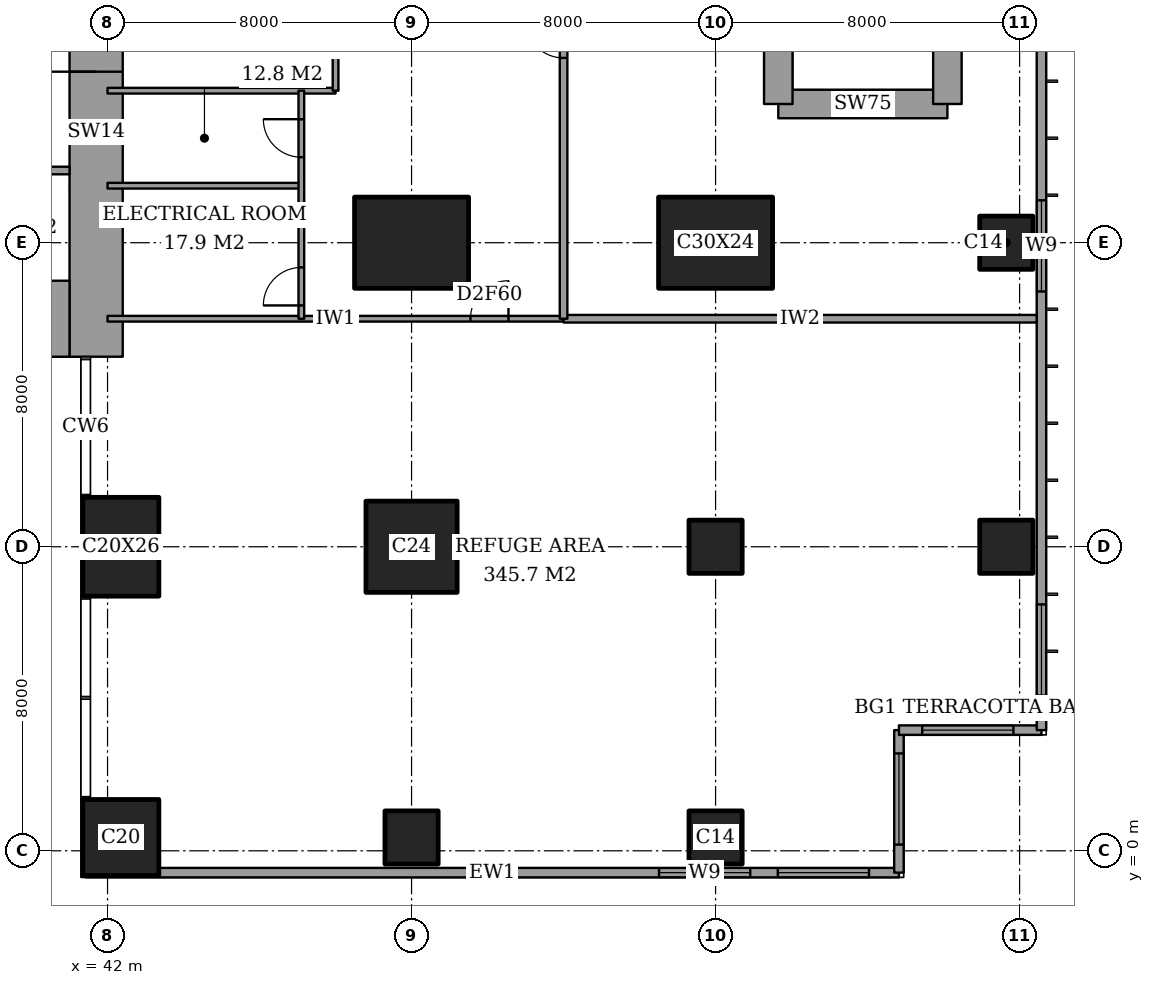
"""IFC4 building model, lengths in metres.
Left out: names, types, materials, properties, quantities, classifications, styles, units other than length and angle.
Written with IfcOpenShell. Run it as: python <this file> out.ifc"""

import sys

from ifc_helpers import new_model, si_unit, direction, frame, frame_2d, origin, origin_2d, place, context, subcontext, project, spatial, rectangle, extrude, element, fill, save


model = new_model("IFC4")
c1 = context("Model", 3, precision=1e-05, world=origin(), true_north=direction((0.0, 1.0)))
c2 = subcontext(c1, "Body", "Model", "MODEL_VIEW")
j1 = project(units=[si_unit("LENGTHUNIT", "METRE"), si_unit("PLANEANGLEUNIT", "RADIAN")], contexts=[c1])
p1 = place(None, origin())
s1 = spatial("IfcSite", under=j1, at=p1, CompositionType="ELEMENT")
p2 = place(p1, origin())
s2 = spatial("IfcBuilding", under=s1, at=p2, CompositionType="ELEMENT")
p3 = place(p2, frame((0.0, 0.0, 277.2)))
s3 = spatial("IfcBuildingStorey", under=s2, at=p3, CompositionType="ELEMENT", Elevation=277.2)
p4 = place(p3, frame((42.35, 0.35, 0.0), z_axis=(0.0, 0.0, 1.0), x_axis=(1.0, 0.0, 0.0)))
e1 = element("IfcColumn", 1, at=p4, inside=s3, PredefinedType="COLUMN", context=c2, shape_type="SweptSolid", body=[
    extrude(rectangle(XDim=2.0, YDim=2.0, at=origin_2d()), origin(), (0.0, 0.0, 1.0), 5.4),
])
p5 = place(p3, frame((42.35, 8.0, 0.0), z_axis=(0.0, 0.0, 1.0), x_axis=(1.0, 0.0, 0.0)))
e2 = element("IfcColumn", 2, at=p5, inside=s3, PredefinedType="COLUMN", context=c2, shape_type="SweptSolid", body=[
    extrude(rectangle(XDim=2.0, YDim=2.6, at=origin_2d()), origin(), (0.0, 0.0, 1.0), 5.4),
])
p6 = place(p3, frame((50.0, 0.35, 0.0), z_axis=(0.0, 0.0, 1.0), x_axis=(1.0, 0.0, 0.0)))
e3 = element("IfcColumn", 3, at=p6, inside=s3, PredefinedType="COLUMN", context=c2, shape_type="SweptSolid", body=[
    extrude(rectangle(XDim=1.4, YDim=1.4, at=origin_2d()), origin(), (0.0, 0.0, 1.0), 5.4),
])
p7 = place(p3, frame((50.0, 8.0, 0.0), z_axis=(0.0, 0.0, 1.0), x_axis=(1.0, 0.0, 0.0)))
e4 = element("IfcColumn", 4, at=p7, inside=s3, PredefinedType="COLUMN", context=c2, shape_type="SweptSolid", body=[
    extrude(rectangle(XDim=2.4, YDim=2.4, at=origin_2d()), origin(), (0.0, 0.0, 1.0), 5.4),
])
p8 = place(p3, frame((50.0, 16.0, 0.0), z_axis=(0.0, 0.0, 1.0), x_axis=(1.0, 0.0, 0.0)))
e5 = element("IfcColumn", 5, at=p8, inside=s3, PredefinedType="COLUMN", context=c2, shape_type="SweptSolid", body=[
    extrude(rectangle(XDim=3.0, YDim=2.4, at=origin_2d()), origin(), (0.0, 0.0, 1.0), 5.4),
])
for number, where, z_axis, x_axis in (
    (6, (58.0, 0.35, 0.0), (0.0, 0.0, 1.0), (1.0, 0.0, 0.0)),
    (7, (58.0, 8.0, 0.0), (0.0, 0.0, 1.0), (1.0, 0.0, 0.0)),
):
    element("IfcColumn", number, at=place(p3, frame(where, z_axis=z_axis, x_axis=x_axis)), inside=s3, PredefinedType="COLUMN", context=c2, shape_type="SweptSolid", body=[
        extrude(rectangle(XDim=1.4, YDim=1.4, at=origin_2d()), origin(), (0.0, 0.0, 1.0), 5.4),
    ])
p9 = place(p3, frame((58.0, 16.0, 0.0), z_axis=(0.0, 0.0, 1.0), x_axis=(1.0, 0.0, 0.0)))
e8 = element("IfcColumn", 8, at=p9, inside=s3, PredefinedType="COLUMN", context=c2, shape_type="SweptSolid", body=[
    extrude(rectangle(XDim=3.0, YDim=2.4, at=origin_2d()), origin(), (0.0, 0.0, 1.0), 5.4),
])
for number, where, z_axis, x_axis in (
    (9, (65.65, 8.0, 0.0), (0.0, 0.0, 1.0), (1.0, 0.0, 0.0)),
    (10, (65.65, 16.0, 0.0), (0.0, 0.0, 1.0), (1.0, 0.0, 0.0)),
):
    element("IfcColumn", number, at=place(p3, frame(where, z_axis=z_axis, x_axis=x_axis)), inside=s3, PredefinedType="COLUMN", context=c2, shape_type="SweptSolid", body=[
        extrude(rectangle(XDim=1.4, YDim=1.4, at=origin_2d()), origin(), (0.0, 0.0, 1.0), 5.4),
    ])
p10 = place(p3, frame((37.85, 14.0, 0.0), z_axis=(0.0, 0.0, 1.0), x_axis=(1.0, 0.0, 0.0)))
e11 = element("IfcWall", 11, at=p10, inside=s3, PredefinedType="SHEAR", context=c2, shape_type="SweptSolid", body=[
    extrude(rectangle(XDim=3.15, YDim=2.0, at=frame_2d((1.575, 0.0))), origin(), (0.0, 0.0, 1.0), 5.4),
])
p11 = place(p3, frame((41.7, 13.0, 0.0), z_axis=(0.0, 0.0, 1.0), x_axis=(0.0, 1.0, 0.0)))
e12 = element("IfcWall", 12, at=p11, inside=s3, PredefinedType="SHEAR", context=c2, shape_type="SweptSolid", body=[
    extrude(rectangle(XDim=11.85, YDim=1.4, at=frame_2d((5.925, 0.0))), origin(), (0.0, 0.0, 1.0), 5.4),
])
p12 = place(p11, frame((7.5, 0.0, 0.0)))
e13 = element("IfcOpeningElement", 13, at=p12, cuts=e12, PredefinedType="OPENING", context=c2, shape_type="SweptSolid", body=[
    extrude(rectangle(XDim=1.8, YDim=2.4, at=frame_2d((0.9, 1.2))), frame((0.0, 0.71, 0.0), z_axis=(0.0, -1.0, 0.0), x_axis=(1.0, 0.0, 0.0)), (0.0, 0.0, 1.0), 1.42),
])
p13 = place(p3, frame((59.65, 19.65, 0.0), z_axis=(0.0, 0.0, 1.0), x_axis=(1.0, 0.0, 0.0)))
e14 = element("IfcWall", 14, at=p13, inside=s3, PredefinedType="SHEAR", context=c2, shape_type="SweptSolid", body=[
    extrude(rectangle(XDim=4.45, YDim=0.75, at=frame_2d((2.225, 0.0))), origin(), (0.0, 0.0, 1.0), 5.4),
])
for number, where, z_axis, x_axis in (
    (15, (64.1, 19.65, 0.0), (0.0, 0.0, 1.0), (0.0, 1.0, 0.0)),
    (16, (59.65, 28.35, 0.0), (0.0, 0.0, 1.0), (0.0, -1.0, 0.0)),
):
    element("IfcWall", number, at=place(p3, frame(where, z_axis=z_axis, x_axis=x_axis)), inside=s3, PredefinedType="SHEAR", context=c2, shape_type="SweptSolid", body=[
        extrude(rectangle(XDim=8.7, YDim=0.75, at=frame_2d((4.35, 0.0))), origin(), (0.0, 0.0, 1.0), 5.4),
    ])
p14 = place(p3, frame((41.425, -0.575, 0.0), z_axis=(0.0, 0.0, 1.0), x_axis=(1.0, 0.0, 0.0)))
e17 = element("IfcWall", 17, at=p14, inside=s3, PredefinedType="SOLIDWALL", context=c2, shape_type="SweptSolid", body=[
    extrude(rectangle(XDim=21.4, YDim=0.25, at=frame_2d((10.7, 0.0))), origin(), (0.0, 0.0, 1.0), 5.4),
])
p15 = place(p14, frame((15.087, 0.0, 0.9)))
e18 = element("IfcOpeningElement", 18, at=p15, cuts=e17, PredefinedType="OPENING", context=c2, shape_type="SweptSolid", body=[
    extrude(rectangle(XDim=2.4, YDim=2.4, at=frame_2d((1.2, 1.2))), frame((0.0, 0.135, 0.0), z_axis=(0.0, -1.0, 0.0), x_axis=(1.0, 0.0, 0.0)), (0.0, 0.0, 1.0), 0.27),
])
p16 = place(p14, frame((18.212, 0.0, 0.9)))
e19 = element("IfcOpeningElement", 19, at=p16, cuts=e17, PredefinedType="OPENING", context=c2, shape_type="SweptSolid", body=[
    extrude(rectangle(XDim=2.4, YDim=2.4, at=frame_2d((1.2, 1.2))), frame((0.0, 0.135, 0.0), z_axis=(0.0, -1.0, 0.0), x_axis=(1.0, 0.0, 0.0)), (0.0, 0.0, 1.0), 0.27),
])
p17 = place(p3, frame((62.825, -0.575, 0.0), z_axis=(0.0, 0.0, 1.0), x_axis=(0.0, 1.0, 0.0)))
e20 = element("IfcWall", 20, at=p17, inside=s3, PredefinedType="SOLIDWALL", context=c2, shape_type="SweptSolid", body=[
    extrude(rectangle(XDim=3.75, YDim=0.25, at=frame_2d((1.875, 0.0))), origin(), (0.0, 0.0, 1.0), 5.4),
])
p18 = place(p17, frame((0.738, 0.0, 0.9)))
e21 = element("IfcOpeningElement", 21, at=p18, cuts=e20, PredefinedType="OPENING", context=c2, shape_type="SweptSolid", body=[
    extrude(rectangle(XDim=2.4, YDim=2.4, at=frame_2d((1.2, 1.2))), frame((0.0, 0.135, 0.0), z_axis=(0.0, -1.0, 0.0), x_axis=(1.0, 0.0, 0.0)), (0.0, 0.0, 1.0), 0.27),
])
p19 = place(p3, frame((62.825, 3.175, 0.0), z_axis=(0.0, 0.0, 1.0), x_axis=(1.0, 0.0, 0.0)))
e22 = element("IfcWall", 22, at=p19, inside=s3, PredefinedType="SOLIDWALL", context=c2, shape_type="SweptSolid", body=[
    extrude(rectangle(XDim=3.75, YDim=0.25, at=frame_2d((1.875, 0.0))), origin(), (0.0, 0.0, 1.0), 5.4),
])
p20 = place(p19, frame((0.613, 0.0, 0.9)))
e23 = element("IfcOpeningElement", 23, at=p20, cuts=e22, PredefinedType="OPENING", context=c2, shape_type="SweptSolid", body=[
    extrude(rectangle(XDim=2.4, YDim=2.4, at=frame_2d((1.2, 1.2))), frame((0.0, 0.135, 0.0), z_axis=(0.0, -1.0, 0.0), x_axis=(1.0, 0.0, 0.0)), (0.0, 0.0, 1.0), 0.27),
])
p21 = place(p3, frame((66.575, 3.175, 0.0), z_axis=(0.0, 0.0, 1.0), x_axis=(0.0, 1.0, 0.0)))
e24 = element("IfcWall", 24, at=p21, inside=s3, PredefinedType="SOLIDWALL", context=c2, shape_type="SweptSolid", body=[
    extrude(rectangle(XDim=41.65, YDim=0.25, at=frame_2d((20.825, 0.0))), origin(), (0.0, 0.0, 1.0), 5.4),
])
p22 = place(p21, frame((0.908, 0.0, 0.9)))
e25 = element("IfcOpeningElement", 25, at=p22, cuts=e24, PredefinedType="OPENING", context=c2, shape_type="SweptSolid", body=[
    extrude(rectangle(XDim=2.4, YDim=2.4, at=frame_2d((1.2, 1.2))), frame((0.0, 0.135, 0.0), z_axis=(0.0, -1.0, 0.0), x_axis=(1.0, 0.0, 0.0)), (0.0, 0.0, 1.0), 0.27),
])
p23 = place(p21, frame((11.542, 0.0, 0.9)))
e26 = element("IfcOpeningElement", 26, at=p23, cuts=e24, PredefinedType="OPENING", context=c2, shape_type="SweptSolid", body=[
    extrude(rectangle(XDim=2.4, YDim=2.4, at=frame_2d((1.2, 1.2))), frame((0.0, 0.135, 0.0), z_axis=(0.0, -1.0, 0.0), x_axis=(1.0, 0.0, 0.0)), (0.0, 0.0, 1.0), 0.27),
])
p24 = place(p21, frame((27.708, 0.0, 0.9)))
e27 = element("IfcOpeningElement", 27, at=p24, cuts=e24, PredefinedType="OPENING", context=c2, shape_type="SweptSolid", body=[
    extrude(rectangle(XDim=2.4, YDim=2.4, at=frame_2d((1.2, 1.2))), frame((0.0, 0.135, 0.0), z_axis=(0.0, -1.0, 0.0), x_axis=(1.0, 0.0, 0.0)), (0.0, 0.0, 1.0), 0.27),
])
p25 = place(p21, frame((38.342, 0.0, 0.9)))
e28 = element("IfcOpeningElement", 28, at=p25, cuts=e24, PredefinedType="OPENING", context=c2, shape_type="SweptSolid", body=[
    extrude(rectangle(XDim=2.4, YDim=2.4, at=frame_2d((1.2, 1.2))), frame((0.0, 0.135, 0.0), z_axis=(0.0, -1.0, 0.0), x_axis=(1.0, 0.0, 0.0)), (0.0, 0.0, 1.0), 0.27),
])
p26 = place(p3, frame((54.0, 14.0, 0.0), z_axis=(0.0, 0.0, 1.0), x_axis=(1.0, 0.0, 0.0)))
e29 = element("IfcWall", 29, at=p26, inside=s3, PredefinedType="PARTITIONING", context=c2, shape_type="SweptSolid", body=[
    extrude(rectangle(XDim=12.45, YDim=0.2, at=frame_2d((6.225, 0.0))), origin(), (0.0, 0.0, 1.0), 5.15),
])
p27 = place(p3, frame((42.0, 14.0, 0.0), z_axis=(0.0, 0.0, 1.0), x_axis=(1.0, 0.0, 0.0)))
e30 = element("IfcWall", 30, at=p27, inside=s3, PredefinedType="PARTITIONING", context=c2, shape_type="SweptSolid", body=[
    extrude(rectangle(XDim=12.0, YDim=0.15, at=frame_2d((6.0, 0.0))), origin(), (0.0, 0.0, 1.0), 5.15),
])
p28 = place(p27, frame((9.55, 0.0, 0.0)))
e31 = element("IfcOpeningElement", 31, at=p28, cuts=e30, PredefinedType="OPENING", context=c2, shape_type="SweptSolid", body=[
    extrude(rectangle(XDim=1.0, YDim=2.1, at=frame_2d((0.5, 1.05))), frame((0.0, 0.085, 0.0), z_axis=(0.0, -1.0, 0.0), x_axis=(1.0, 0.0, 0.0)), (0.0, 0.0, 1.0), 0.17),
])
p29 = place(p3, frame((42.0, 17.5, 0.0), z_axis=(0.0, 0.0, 1.0), x_axis=(1.0, 0.0, 0.0)))
e32 = element("IfcWall", 32, at=p29, inside=s3, PredefinedType="PARTITIONING", context=c2, shape_type="SweptSolid", body=[
    extrude(rectangle(XDim=5.1, YDim=0.15, at=frame_2d((2.55, 0.0))), origin(), (0.0, 0.0, 1.0), 5.15),
])
p30 = place(p3, frame((42.0, 20.0, 0.0), z_axis=(0.0, 0.0, 1.0), x_axis=(1.0, 0.0, 0.0)))
e33 = element("IfcWall", 33, at=p30, inside=s3, PredefinedType="PARTITIONING", context=c2, shape_type="SweptSolid", body=[
    extrude(rectangle(XDim=6.0, YDim=0.15, at=frame_2d((3.0, 0.0))), origin(), (0.0, 0.0, 1.0), 5.15),
])
p31 = place(p3, frame((47.1, 14.0, 0.0), z_axis=(0.0, 0.0, 1.0), x_axis=(0.0, 1.0, 0.0)))
e34 = element("IfcWall", 34, at=p31, inside=s3, PredefinedType="PARTITIONING", context=c2, shape_type="SweptSolid", body=[
    extrude(rectangle(XDim=6.0, YDim=0.15, at=frame_2d((3.0, 0.0))), origin(), (0.0, 0.0, 1.0), 5.15),
])
p32 = place(p31, frame((0.35, 0.0, 0.0)))
e35 = element("IfcOpeningElement", 35, at=p32, cuts=e34, PredefinedType="OPENING", context=c2, shape_type="SweptSolid", body=[
    extrude(rectangle(XDim=1.0, YDim=2.1, at=frame_2d((0.5, 1.05))), frame((0.0, 0.085, 0.0), z_axis=(0.0, -1.0, 0.0), x_axis=(1.0, 0.0, 0.0)), (0.0, 0.0, 1.0), 0.17),
])
p33 = place(p31, frame((4.25, 0.0, 0.0)))
e36 = element("IfcOpeningElement", 36, at=p33, cuts=e34, PredefinedType="OPENING", context=c2, shape_type="SweptSolid", body=[
    extrude(rectangle(XDim=1.0, YDim=2.1, at=frame_2d((0.5, 1.05))), frame((0.0, 0.085, 0.0), z_axis=(0.0, -1.0, 0.0), x_axis=(1.0, 0.0, 0.0)), (0.0, 0.0, 1.0), 0.17),
])
p34 = place(p3, frame((48.0, 20.0, 0.0), z_axis=(0.0, 0.0, 1.0), x_axis=(0.0, 1.0, 0.0)))
e37 = element("IfcWall", 37, at=p34, inside=s3, PredefinedType="PARTITIONING", context=c2, shape_type="SweptSolid", body=[
    extrude(rectangle(XDim=8.0, YDim=0.15, at=frame_2d((4.0, 0.0))), origin(), (0.0, 0.0, 1.0), 5.15),
])
p35 = place(p34, frame((3.5, 0.0, 0.0)))
e38 = element("IfcOpeningElement", 38, at=p35, cuts=e37, PredefinedType="OPENING", context=c2, shape_type="SweptSolid", body=[
    extrude(rectangle(XDim=1.0, YDim=2.1, at=frame_2d((0.5, 1.05))), frame((0.0, 0.085, 0.0), z_axis=(0.0, -1.0, 0.0), x_axis=(1.0, 0.0, 0.0)), (0.0, 0.0, 1.0), 0.17),
])
p36 = place(p3, frame((54.0, 14.0, 0.0), z_axis=(0.0, 0.0, 1.0), x_axis=(0.0, 1.0, 0.0)))
e39 = element("IfcWall", 39, at=p36, inside=s3, PredefinedType="PARTITIONING", context=c2, shape_type="SweptSolid", body=[
    extrude(rectangle(XDim=14.725, YDim=0.2, at=frame_2d((7.363, 0.0))), origin(), (0.0, 0.0, 1.0), 5.15),
])
p37 = place(p36, frame((6.863, 0.0, 0.0)))
e40 = element("IfcOpeningElement", 40, at=p37, cuts=e39, PredefinedType="OPENING", context=c2, shape_type="SweptSolid", body=[
    extrude(rectangle(XDim=1.0, YDim=2.1, at=frame_2d((0.5, 1.05))), frame((0.0, 0.11, 0.0), z_axis=(0.0, -1.0, 0.0), x_axis=(1.0, 0.0, 0.0)), (0.0, 0.0, 1.0), 0.22),
])
p38 = place(p3, frame((28.3, 17.9, 0.0), z_axis=(0.0, 0.0, 1.0), x_axis=(1.0, 0.0, 0.0)))
e41 = element("IfcWall", 41, at=p38, inside=s3, PredefinedType="PARTITIONING", context=c2, shape_type="SweptSolid", body=[
    extrude(rectangle(XDim=12.7, YDim=0.2, at=frame_2d((6.35, 0.0))), origin(), (0.0, 0.0, 1.0), 5.4),
])
p39 = place(p38, frame((1.05, 0.0, 0.0)))
e42 = element("IfcOpeningElement", 42, at=p39, cuts=e41, PredefinedType="OPENING", context=c2, shape_type="SweptSolid", body=[
    extrude(rectangle(XDim=0.9, YDim=2.1, at=frame_2d((0.45, 1.05))), frame((0.0, 0.11, 0.0), z_axis=(0.0, -1.0, 0.0), x_axis=(1.0, 0.0, 0.0)), (0.0, 0.0, 1.0), 0.22),
])
p40 = place(p38, frame((10.6, 0.0, 0.0)))
e43 = element("IfcOpeningElement", 43, at=p40, cuts=e41, PredefinedType="OPENING", context=c2, shape_type="SweptSolid", body=[
    extrude(rectangle(XDim=1.2, YDim=2.1, at=frame_2d((0.6, 1.05))), frame((0.0, 0.11, 0.0), z_axis=(0.0, -1.0, 0.0), x_axis=(1.0, 0.0, 0.0)), (0.0, 0.0, 1.0), 0.22),
])
p41 = place(p15, origin())
e44 = element("IfcWindow", 44, at=p41, inside=s3, PartitioningType="SINGLE_PANEL", PredefinedType="WINDOW", context=c2, shape_type="SweptSolid", body=[
    extrude(rectangle(XDim=2.4, YDim=2.4, at=frame_2d((1.2, 1.2))), frame((0.0, 0.03, 0.0), z_axis=(0.0, -1.0, 0.0), x_axis=(1.0, 0.0, 0.0)), (0.0, 0.0, 1.0), 0.06),
])
fill(e18, e44)
p42 = place(p16, origin())
e45 = element("IfcWindow", 45, at=p42, inside=s3, PartitioningType="SINGLE_PANEL", PredefinedType="WINDOW", context=c2, shape_type="SweptSolid", body=[
    extrude(rectangle(XDim=2.4, YDim=2.4, at=frame_2d((1.2, 1.2))), frame((0.0, 0.03, 0.0), z_axis=(0.0, -1.0, 0.0), x_axis=(1.0, 0.0, 0.0)), (0.0, 0.0, 1.0), 0.06),
])
fill(e19, e45)
p43 = place(p18, origin())
e46 = element("IfcWindow", 46, at=p43, inside=s3, PartitioningType="SINGLE_PANEL", PredefinedType="WINDOW", context=c2, shape_type="SweptSolid", body=[
    extrude(rectangle(XDim=2.4, YDim=2.4, at=frame_2d((1.2, 1.2))), frame((0.0, 0.03, 0.0), z_axis=(0.0, -1.0, 0.0), x_axis=(1.0, 0.0, 0.0)), (0.0, 0.0, 1.0), 0.06),
])
fill(e21, e46)
p44 = place(p20, origin())
e47 = element("IfcWindow", 47, at=p44, inside=s3, PartitioningType="SINGLE_PANEL", PredefinedType="WINDOW", context=c2, shape_type="SweptSolid", body=[
    extrude(rectangle(XDim=2.4, YDim=2.4, at=frame_2d((1.2, 1.2))), frame((0.0, 0.03, 0.0), z_axis=(0.0, -1.0, 0.0), x_axis=(1.0, 0.0, 0.0)), (0.0, 0.0, 1.0), 0.06),
])
fill(e23, e47)
p45 = place(p22, origin())
e48 = element("IfcWindow", 48, at=p45, inside=s3, PartitioningType="SINGLE_PANEL", PredefinedType="WINDOW", context=c2, shape_type="SweptSolid", body=[
    extrude(rectangle(XDim=2.4, YDim=2.4, at=frame_2d((1.2, 1.2))), frame((0.0, 0.03, 0.0), z_axis=(0.0, -1.0, 0.0), x_axis=(1.0, 0.0, 0.0)), (0.0, 0.0, 1.0), 0.06),
])
fill(e25, e48)
p46 = place(p23, origin())
e49 = element("IfcWindow", 49, at=p46, inside=s3, PartitioningType="SINGLE_PANEL", PredefinedType="WINDOW", context=c2, shape_type="SweptSolid", body=[
    extrude(rectangle(XDim=2.4, YDim=2.4, at=frame_2d((1.2, 1.2))), frame((0.0, 0.03, 0.0), z_axis=(0.0, -1.0, 0.0), x_axis=(1.0, 0.0, 0.0)), (0.0, 0.0, 1.0), 0.06),
])
fill(e26, e49)
p47 = place(p28, origin())
e50 = element("IfcDoor", 50, at=p47, inside=s3, OperationType="SINGLE_SWING_LEFT", PredefinedType="DOOR", context=c2, shape_type="SweptSolid", body=[
    extrude(rectangle(XDim=1.0, YDim=2.1, at=frame_2d((0.5, 1.05))), frame((0.0, 0.025, 0.0), z_axis=(0.0, -1.0, 0.0), x_axis=(1.0, 0.0, 0.0)), (0.0, 0.0, 1.0), 0.05),
])
fill(e31, e50)
p48 = place(p37, origin())
e51 = element("IfcDoor", 51, at=p48, inside=s3, OperationType="SINGLE_SWING_LEFT", PredefinedType="DOOR", context=c2, shape_type="SweptSolid", body=[
    extrude(rectangle(XDim=1.0, YDim=2.1, at=frame_2d((0.5, 1.05))), frame((0.0, 0.025, 0.0), z_axis=(0.0, -1.0, 0.0), x_axis=(1.0, 0.0, 0.0)), (0.0, 0.0, 1.0), 0.05),
])
fill(e40, e51)
p49 = place(p32, origin())
e52 = element("IfcDoor", 52, at=p49, inside=s3, OperationType="SINGLE_SWING_RIGHT", PredefinedType="DOOR", context=c2, shape_type="SweptSolid", body=[
    extrude(rectangle(XDim=1.0, YDim=2.1, at=frame_2d((0.5, 1.05))), frame((0.0, 0.025, 0.0), z_axis=(0.0, -1.0, 0.0), x_axis=(1.0, 0.0, 0.0)), (0.0, 0.0, 1.0), 0.05),
])
fill(e35, e52)
p50 = place(p33, origin())
e53 = element("IfcDoor", 53, at=p50, inside=s3, OperationType="SINGLE_SWING_LEFT", PredefinedType="DOOR", context=c2, shape_type="SweptSolid", body=[
    extrude(rectangle(XDim=1.0, YDim=2.1, at=frame_2d((0.5, 1.05))), frame((0.0, 0.025, 0.0), z_axis=(0.0, -1.0, 0.0), x_axis=(1.0, 0.0, 0.0)), (0.0, 0.0, 1.0), 0.05),
])
fill(e36, e53)
p51 = place(p12, origin())
e54 = element("IfcDoor", 54, at=p51, inside=s3, OperationType="DOUBLE_DOOR_DOUBLE_SWING", PredefinedType="DOOR", context=c2, shape_type="SweptSolid", body=[
    extrude(rectangle(XDim=1.8, YDim=2.4, at=frame_2d((0.9, 1.2))), frame((0.0, 0.025, 0.0), z_axis=(0.0, -1.0, 0.0), x_axis=(1.0, 0.0, 0.0)), (0.0, 0.0, 1.0), 0.05),
])
fill(e13, e54)
save(model, sys.argv[1])
